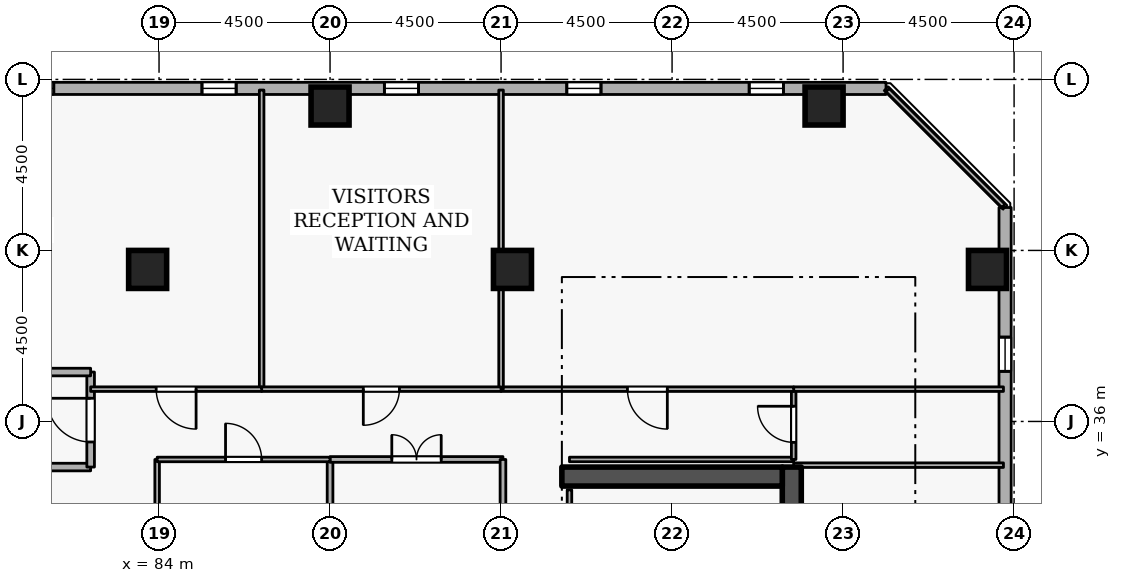
"""IFC4 building model, lengths in metres.
Left out: names, types, materials, properties, quantities, classifications, styles, units other than length and angle.
Written with IfcOpenShell. Run it as: python <this file> out.ifc"""

import sys

from ifc_helpers import new_model, si_unit, direction, frame, frame_2d, origin, origin_2d, place, context, subcontext, project, spatial, rectangle, extrude, element, fill, save


model = new_model("IFC4")
c1 = context("Model", 3, precision=1e-05, world=origin(), true_north=direction((0.0, 1.0)))
c2 = subcontext(c1, "Body", "Model", "MODEL_VIEW")
j1 = project(units=[si_unit("LENGTHUNIT", "METRE"), si_unit("PLANEANGLEUNIT", "RADIAN")], contexts=[c1])
p1 = place(None, origin())
s1 = spatial("IfcSite", under=j1, at=p1, CompositionType="ELEMENT")
p2 = place(p1, origin())
s2 = spatial("IfcBuilding", under=s1, at=p2, CompositionType="ELEMENT")
p3 = place(p2, frame((0.0, 0.0, 214.5)))
s3 = spatial("IfcBuildingStorey", under=s2, at=p3, CompositionType="ELEMENT", Elevation=214.5)
p4 = place(p3, frame((100.65, 19.2, 0.0), z_axis=(0.0, 0.0, 1.0), x_axis=(0.0, 1.0, 0.0)))
e1 = element("IfcWall", 1, at=p4, inside=s3, PredefinedType="SHEAR", context=c2, shape_type="SweptSolid", body=[
    extrude(rectangle(XDim=15.6, YDim=0.5, at=frame_2d((7.8, 0.0))), origin(), (0.0, 0.0, 1.0), 3.6),
])
p5 = place(p3, frame((94.6, 34.55, 0.0), z_axis=(0.0, 0.0, 1.0), x_axis=(1.0, 0.0, 0.0)))
e2 = element("IfcWall", 2, at=p5, inside=s3, PredefinedType="SHEAR", context=c2, shape_type="SweptSolid", body=[
    extrude(rectangle(XDim=5.8, YDim=0.5, at=frame_2d((2.9, 0.0))), origin(), (0.0, 0.0, 1.0), 3.6),
])
for number, where, z_axis, x_axis in (
    (3, (105.8, 40.0, 0.0), (0.0, 0.0, 1.0), (1.0, 0.0, 0.0)),
    (4, (101.5, 44.3, 0.0), (0.0, 0.0, 1.0), (1.0, 0.0, 0.0)),
    (5, (88.5, 44.3, 0.0), (0.0, 0.0, 1.0), (1.0, 0.0, 0.0)),
    (6, (93.3, 40.0, 0.0), (0.0, 0.0, 1.0), (1.0, 0.0, 0.0)),
    (7, (83.7, 40.0, 0.0), (0.0, 0.0, 1.0), (1.0, 0.0, 0.0)),
):
    element("IfcColumn", number, at=place(p3, frame(where, z_axis=z_axis, x_axis=x_axis)), inside=s3, PredefinedType="COLUMN", context=c2, shape_type="SweptSolid", body=[
        extrude(rectangle(XDim=1.0, YDim=1.0, at=origin_2d()), origin(), (0.0, 0.0, 1.0), 3.6),
    ])
p6 = place(p3, frame((106.265, 5.819, 0.0), z_axis=(0.0, 0.0, 1.0), x_axis=(-5.4540124e-05, 0.999999998513, 0.0)))
e8 = element("IfcWall", 8, at=p6, inside=s3, PredefinedType="STANDARD", context=c2, shape_type="SweptSolid", body=[
    extrude(rectangle(XDim=35.811, YDim=0.32, at=frame_2d((17.905, 0.0))), origin(), (0.0, 0.0, 1.0), 2.7),
])
p7 = place(p6, frame((2.7, 0.0, 0.72)))
e9 = element("IfcOpeningElement", 9, at=p7, cuts=e8, PredefinedType="OPENING", context=c2, shape_type="SweptSolid", body=[
    extrude(rectangle(XDim=0.9, YDim=1.75, at=frame_2d((0.45, 0.875))), frame((0.0, 0.17, 0.0), z_axis=(0.0, -1.0, 0.0), x_axis=(1.0, 0.0, 0.0)), (0.0, 0.0, 1.0), 0.34),
])
p8 = place(p6, frame((12.3, 0.0, 0.72)))
e10 = element("IfcOpeningElement", 10, at=p8, cuts=e8, PredefinedType="OPENING", context=c2, shape_type="SweptSolid", body=[
    extrude(rectangle(XDim=0.9, YDim=1.75, at=frame_2d((0.45, 0.875))), frame((0.0, 0.17, 0.0), z_axis=(0.0, -1.0, 0.0), x_axis=(1.0, 0.0, 0.0)), (0.0, 0.0, 1.0), 0.34),
])
p9 = place(p6, frame((17.1, 0.0, 0.72)))
e11 = element("IfcOpeningElement", 11, at=p9, cuts=e8, PredefinedType="OPENING", context=c2, shape_type="SweptSolid", body=[
    extrude(rectangle(XDim=0.9, YDim=1.75, at=frame_2d((0.45, 0.875))), frame((0.0, 0.17, 0.0), z_axis=(0.0, -1.0, 0.0), x_axis=(1.0, 0.0, 0.0)), (0.0, 0.0, 1.0), 0.34),
])
p10 = place(p6, frame((26.7, 0.0, 0.72)))
e12 = element("IfcOpeningElement", 12, at=p10, cuts=e8, PredefinedType="OPENING", context=c2, shape_type="SweptSolid", body=[
    extrude(rectangle(XDim=0.9, YDim=1.75, at=frame_2d((0.45, 0.875))), frame((0.0, 0.17, 0.0), z_axis=(0.0, -1.0, 0.0), x_axis=(1.0, 0.0, 0.0)), (0.0, 0.0, 1.0), 0.34),
])
p11 = place(p6, frame((31.5, 0.0, 0.72)))
e13 = element("IfcOpeningElement", 13, at=p11, cuts=e8, PredefinedType="OPENING", context=c2, shape_type="SweptSolid", body=[
    extrude(rectangle(XDim=0.9, YDim=1.75, at=frame_2d((0.45, 0.875))), frame((0.0, 0.17, 0.0), z_axis=(0.0, -1.0, 0.0), x_axis=(1.0, 0.0, 0.0)), (0.0, 0.0, 1.0), 0.34),
])
p12 = place(p3, frame((103.129, 44.763, 0.0), z_axis=(0.0, 0.0, 1.0), x_axis=(-0.999999998513, 5.4540124e-05, 0.0)))
e14 = element("IfcWall", 14, at=p12, inside=s3, PredefinedType="STANDARD", context=c2, shape_type="SweptSolid", body=[
    extrude(rectangle(XDim=35.811, YDim=0.32, at=frame_2d((17.905, 0.0))), origin(), (0.0, 0.0, 1.0), 2.7),
])
p13 = place(p12, frame((2.7, 0.0, 0.72)))
e15 = element("IfcOpeningElement", 15, at=p13, cuts=e14, PredefinedType="OPENING", context=c2, shape_type="SweptSolid", body=[
    extrude(rectangle(XDim=0.9, YDim=1.75, at=frame_2d((0.45, 0.875))), frame((0.0, 0.17, 0.0), z_axis=(0.0, -1.0, 0.0), x_axis=(1.0, 0.0, 0.0)), (0.0, 0.0, 1.0), 0.34),
])
p14 = place(p12, frame((7.5, 0.0, 0.72)))
e16 = element("IfcOpeningElement", 16, at=p14, cuts=e14, PredefinedType="OPENING", context=c2, shape_type="SweptSolid", body=[
    extrude(rectangle(XDim=0.9, YDim=1.75, at=frame_2d((0.45, 0.875))), frame((0.0, 0.17, 0.0), z_axis=(0.0, -1.0, 0.0), x_axis=(1.0, 0.0, 0.0)), (0.0, 0.0, 1.0), 0.34),
])
p15 = place(p12, frame((12.3, 0.0, 0.72)))
e17 = element("IfcOpeningElement", 17, at=p15, cuts=e14, PredefinedType="OPENING", context=c2, shape_type="SweptSolid", body=[
    extrude(rectangle(XDim=0.9, YDim=1.75, at=frame_2d((0.45, 0.875))), frame((0.0, 0.17, 0.0), z_axis=(0.0, -1.0, 0.0), x_axis=(1.0, 0.0, 0.0)), (0.0, 0.0, 1.0), 0.34),
])
p16 = place(p12, frame((17.1, 0.0, 0.72)))
e18 = element("IfcOpeningElement", 18, at=p16, cuts=e14, PredefinedType="OPENING", context=c2, shape_type="SweptSolid", body=[
    extrude(rectangle(XDim=0.9, YDim=1.75, at=frame_2d((0.45, 0.875))), frame((0.0, 0.17, 0.0), z_axis=(0.0, -1.0, 0.0), x_axis=(1.0, 0.0, 0.0)), (0.0, 0.0, 1.0), 0.34),
])
p17 = place(p12, frame((21.9, 0.0, 0.72)))
e19 = element("IfcOpeningElement", 19, at=p17, cuts=e14, PredefinedType="OPENING", context=c2, shape_type="SweptSolid", body=[
    extrude(rectangle(XDim=0.9, YDim=1.75, at=frame_2d((0.45, 0.875))), frame((0.0, 0.17, 0.0), z_axis=(0.0, -1.0, 0.0), x_axis=(1.0, 0.0, 0.0)), (0.0, 0.0, 1.0), 0.34),
])
p18 = place(p12, frame((31.5, 0.0, 0.72)))
e20 = element("IfcOpeningElement", 20, at=p18, cuts=e14, PredefinedType="OPENING", context=c2, shape_type="SweptSolid", body=[
    extrude(rectangle(XDim=0.9, YDim=1.75, at=frame_2d((0.45, 0.875))), frame((0.0, 0.17, 0.0), z_axis=(0.0, -1.0, 0.0), x_axis=(1.0, 0.0, 0.0)), (0.0, 0.0, 1.0), 0.34),
])
p19 = place(p3, frame((79.9, 34.8, 0.0), z_axis=(0.0, 0.0, 1.0), x_axis=(1.0, 0.0, 0.0)))
e21 = element("IfcWall", 21, at=p19, inside=s3, PredefinedType="STANDARD", context=c2, shape_type="SweptSolid", body=[
    extrude(rectangle(XDim=2.3, YDim=0.2, at=frame_2d((1.15, 0.0))), origin(), (0.0, 0.0, 1.0), 2.545),
])
p20 = place(p3, frame((82.2, 34.8, 0.0), z_axis=(0.0, 0.0, 1.0), x_axis=(0.0, 1.0, 0.0)))
e22 = element("IfcWall", 22, at=p20, inside=s3, PredefinedType="STANDARD", context=c2, shape_type="SweptSolid", body=[
    extrude(rectangle(XDim=2.5, YDim=0.2, at=frame_2d((1.25, 0.0))), origin(), (0.0, 0.0, 1.0), 3.34),
])
p21 = place(p20, frame((0.66, 0.0, 0.0)))
e23 = element("IfcOpeningElement", 23, at=p21, cuts=e22, PredefinedType="OPENING", context=c2, shape_type="SweptSolid", body=[
    extrude(rectangle(XDim=1.15, YDim=2.1, at=frame_2d((0.575, 1.05))), frame((0.0, 0.11, 0.0), z_axis=(0.0, -1.0, 0.0), x_axis=(1.0, 0.0, 0.0)), (0.0, 0.0, 1.0), 0.22),
])
p22 = place(p3, frame((82.2, 37.3, 0.0), z_axis=(0.0, 0.0, 1.0), x_axis=(-1.0, 0.0, 0.0)))
e24 = element("IfcWall", 24, at=p22, inside=s3, PredefinedType="STANDARD", context=c2, shape_type="SweptSolid", body=[
    extrude(rectangle(XDim=5.7, YDim=0.2, at=frame_2d((2.85, 0.0))), origin(), (0.0, 0.0, 1.0), 3.34),
])
p23 = place(p3, frame((94.8, 32.1, 0.0), z_axis=(0.0, 0.0, 1.0), x_axis=(0.0, 1.0, 0.0)))
e25 = element("IfcWall", 25, at=p23, inside=s3, PredefinedType="PARTITIONING", context=c2, shape_type="SweptSolid", body=[
    extrude(rectangle(XDim=2.1, YDim=0.12, at=frame_2d((1.05, 0.0))), origin(), (0.0, 0.0, 1.0), 3.34),
])
p24 = place(p23, frame((0.575, 0.0, 0.0)))
e26 = element("IfcOpeningElement", 26, at=p24, cuts=e25, PredefinedType="OPENING", context=c2, shape_type="SweptSolid", body=[
    extrude(rectangle(XDim=0.95, YDim=2.1, at=frame_2d((0.475, 1.05))), frame((0.0, 0.07, 0.0), z_axis=(0.0, -1.0, 0.0), x_axis=(1.0, 0.0, 0.0)), (0.0, 0.0, 1.0), 0.14),
])
p25 = place(p3, frame((94.8, 35.0, 0.0), z_axis=(0.0, 0.0, 1.0), x_axis=(1.0, 0.0, 0.0)))
e27 = element("IfcWall", 27, at=p25, inside=s3, PredefinedType="PARTITIONING", context=c2, shape_type="SweptSolid", body=[
    extrude(rectangle(XDim=5.9, YDim=0.12, at=frame_2d((2.95, 0.0))), origin(), (0.0, 0.0, 1.0), 3.34),
])
p26 = place(p3, frame((100.7, 35.0, 0.0), z_axis=(0.0, 0.0, 1.0), x_axis=(0.0, 1.0, 0.0)))
e28 = element("IfcWall", 28, at=p26, inside=s3, PredefinedType="PARTITIONING", context=c2, shape_type="SweptSolid", body=[
    extrude(rectangle(XDim=1.85, YDim=0.12, at=frame_2d((0.925, 0.0))), origin(), (0.0, 0.0, 1.0), 3.34),
])
p27 = place(p26, frame((0.45, 0.0, 0.0)))
e29 = element("IfcOpeningElement", 29, at=p27, cuts=e28, PredefinedType="OPENING", context=c2, shape_type="SweptSolid", body=[
    extrude(rectangle(XDim=0.95, YDim=2.1, at=frame_2d((0.475, 1.05))), frame((0.0, 0.07, 0.0), z_axis=(0.0, -1.0, 0.0), x_axis=(1.0, 0.0, 0.0)), (0.0, 0.0, 1.0), 0.14),
])
for number, where, z_axis, x_axis in (
    (30, (100.7, 36.85, 0.0), (0.0, 0.0, 1.0), (1.0, 0.0, 0.0)),
    (31, (106.22, 34.85, 0.0), (0.0, 0.0, 1.0), (-1.0, 0.0, 0.0)),
):
    element("IfcWall", number, at=place(p3, frame(where, z_axis=z_axis, x_axis=x_axis)), inside=s3, PredefinedType="PARTITIONING", context=c2, shape_type="SweptSolid", body=[
        extrude(rectangle(XDim=5.52, YDim=0.12, at=frame_2d((2.76, 0.0))), origin(), (0.0, 0.0, 1.0), 3.34),
    ])
p28 = place(p3, frame((100.7, 36.85, 0.0), z_axis=(0.0, 0.0, 1.0), x_axis=(-1.0, 0.0, 0.0)))
e32 = element("IfcWall", 32, at=p28, inside=s3, PredefinedType="PARTITIONING", context=c2, shape_type="SweptSolid", body=[
    extrude(rectangle(XDim=7.7, YDim=0.12, at=frame_2d((3.85, 0.0))), origin(), (0.0, 0.0, 1.0), 3.34),
])
p29 = place(p28, frame((3.325, 0.0, 0.0)))
e33 = element("IfcOpeningElement", 33, at=p29, cuts=e32, PredefinedType="OPENING", context=c2, shape_type="SweptSolid", body=[
    extrude(rectangle(XDim=1.05, YDim=2.1, at=frame_2d((0.525, 1.05))), frame((0.0, 0.07, 0.0), z_axis=(0.0, -1.0, 0.0), x_axis=(1.0, 0.0, 0.0)), (0.0, 0.0, 1.0), 0.14),
])
p30 = place(p3, frame((93.0, 36.85, 0.0), z_axis=(0.0, 0.0, 1.0), x_axis=(0.0, 1.0, 0.0)))
e34 = element("IfcWall", 34, at=p30, inside=s3, PredefinedType="PARTITIONING", context=c2, shape_type="SweptSolid", body=[
    extrude(rectangle(XDim=7.87, YDim=0.12, at=frame_2d((3.935, 0.0))), origin(), (0.0, 0.0, 1.0), 3.34),
])
p31 = place(p3, frame((103.171, 44.72, 0.0), z_axis=(0.0, 0.0, 1.0), x_axis=(0.707106781187, -0.707106781187, 0.0)))
e35 = element("IfcWall", 35, at=p31, inside=s3, PredefinedType="PARTITIONING", context=c2, shape_type="SweptSolid", body=[
    extrude(rectangle(XDim=4.311, YDim=0.12, at=frame_2d((2.156, 0.0))), origin(), (0.0, 0.0, 1.0), 3.34),
])
p32 = place(p3, frame((86.7, 36.85, 0.0), z_axis=(0.0, 0.0, 1.0), x_axis=(0.0, 1.0, 0.0)))
e36 = element("IfcWall", 36, at=p32, inside=s3, PredefinedType="PARTITIONING", context=c2, shape_type="SweptSolid", body=[
    extrude(rectangle(XDim=7.87, YDim=0.12, at=frame_2d((3.935, 0.0))), origin(), (0.0, 0.0, 1.0), 3.34),
])
p33 = place(p3, frame((93.0, 36.85, 0.0), z_axis=(0.0, 0.0, 1.0), x_axis=(-1.0, 0.0, 0.0)))
e37 = element("IfcWall", 37, at=p33, inside=s3, PredefinedType="PARTITIONING", context=c2, shape_type="SweptSolid", body=[
    extrude(rectangle(XDim=6.3, YDim=0.12, at=frame_2d((3.15, 0.0))), origin(), (0.0, 0.0, 1.0), 3.34),
])
p34 = place(p33, frame((2.675, 0.0, 0.0)))
e38 = element("IfcOpeningElement", 38, at=p34, cuts=e37, PredefinedType="OPENING", context=c2, shape_type="SweptSolid", body=[
    extrude(rectangle(XDim=0.95, YDim=2.1, at=frame_2d((0.475, 1.05))), frame((0.0, 0.07, 0.0), z_axis=(0.0, -1.0, 0.0), x_axis=(1.0, 0.0, 0.0)), (0.0, 0.0, 1.0), 0.14),
])
p35 = place(p3, frame((86.7, 36.85, 0.0), z_axis=(0.0, 0.0, 1.0), x_axis=(-1.0, 0.0, 0.0)))
e39 = element("IfcWall", 39, at=p35, inside=s3, PredefinedType="PARTITIONING", context=c2, shape_type="SweptSolid", body=[
    extrude(rectangle(XDim=4.5, YDim=0.12, at=frame_2d((2.25, 0.0))), origin(), (0.0, 0.0, 1.0), 3.34),
])
p36 = place(p35, frame((1.725, 0.0, 0.0)))
e40 = element("IfcOpeningElement", 40, at=p36, cuts=e39, PredefinedType="OPENING", context=c2, shape_type="SweptSolid", body=[
    extrude(rectangle(XDim=1.05, YDim=2.1, at=frame_2d((0.525, 1.05))), frame((0.0, 0.07, 0.0), z_axis=(0.0, -1.0, 0.0), x_axis=(1.0, 0.0, 0.0)), (0.0, 0.0, 1.0), 0.14),
])
p37 = place(p3, frame((88.5, 32.2, 0.0), z_axis=(0.0, 0.0, 1.0), x_axis=(0.0, 1.0, 0.0)))
e41 = element("IfcWall", 41, at=p37, inside=s3, PredefinedType="PARTITIONING", context=c2, shape_type="SweptSolid", body=[
    extrude(rectangle(XDim=2.8, YDim=0.15, at=frame_2d((1.4, 0.0))), origin(), (0.0, 0.0, 1.0), 2.878),
])
p38 = place(p3, frame((88.5, 35.0, 0.0), z_axis=(0.0, 0.0, 1.0), x_axis=(1.0, 0.0, 0.0)))
e42 = element("IfcWall", 42, at=p38, inside=s3, PredefinedType="PARTITIONING", context=c2, shape_type="SweptSolid", body=[
    extrude(rectangle(XDim=4.55, YDim=0.15, at=frame_2d((2.275, 0.0))), origin(), (0.0, 0.0, 1.0), 3.34),
])
p39 = place(p38, frame((1.625, 0.0, 0.0)))
e43 = element("IfcOpeningElement", 43, at=p39, cuts=e42, PredefinedType="OPENING", context=c2, shape_type="SweptSolid", body=[
    extrude(rectangle(XDim=1.3, YDim=2.12, at=frame_2d((0.65, 1.06))), frame((0.0, 0.085, 0.0), z_axis=(0.0, -1.0, 0.0), x_axis=(1.0, 0.0, 0.0)), (0.0, 0.0, 1.0), 0.17),
])
p40 = place(p3, frame((93.05, 35.0, 0.0), z_axis=(0.0, 0.0, 1.0), x_axis=(0.0, -1.0, 0.0)))
e44 = element("IfcWall", 44, at=p40, inside=s3, PredefinedType="PARTITIONING", context=c2, shape_type="SweptSolid", body=[
    extrude(rectangle(XDim=2.8, YDim=0.15, at=frame_2d((1.4, 0.0))), origin(), (0.0, 0.0, 1.0), 3.34),
])
p41 = place(p3, frame((83.95, 32.2, 0.0), z_axis=(0.0, 0.0, 1.0), x_axis=(0.0, 1.0, 0.0)))
e45 = element("IfcWall", 45, at=p41, inside=s3, PredefinedType="PARTITIONING", context=c2, shape_type="SweptSolid", body=[
    extrude(rectangle(XDim=2.8, YDim=0.12, at=frame_2d((1.4, 0.0))), origin(), (0.0, 0.0, 1.0), 3.34),
])
p42 = place(p3, frame((83.95, 35.0, 0.0), z_axis=(0.0, 0.0, 1.0), x_axis=(1.0, 0.0, 0.0)))
e46 = element("IfcWall", 46, at=p42, inside=s3, PredefinedType="PARTITIONING", context=c2, shape_type="SweptSolid", body=[
    extrude(rectangle(XDim=4.55, YDim=0.12, at=frame_2d((2.275, 0.0))), origin(), (0.0, 0.0, 1.0), 3.34),
])
p43 = place(p42, frame((1.8, 0.0, 0.0)))
e47 = element("IfcOpeningElement", 47, at=p43, cuts=e46, PredefinedType="OPENING", context=c2, shape_type="SweptSolid", body=[
    extrude(rectangle(XDim=0.95, YDim=2.1, at=frame_2d((0.475, 1.05))), frame((0.0, 0.07, 0.0), z_axis=(0.0, -1.0, 0.0), x_axis=(1.0, 0.0, 0.0)), (0.0, 0.0, 1.0), 0.14),
])
p44 = place(p11, origin())
e48 = element("IfcWindow", 48, at=p44, inside=s3, PartitioningType="SINGLE_PANEL", PredefinedType="WINDOW", context=c2, shape_type="SweptSolid", body=[
    extrude(rectangle(XDim=0.9, YDim=1.75, at=frame_2d((0.45, 0.875))), frame((0.0, 0.03, 0.0), z_axis=(0.0, -1.0, 0.0), x_axis=(1.0, 0.0, 0.0)), (0.0, 0.0, 1.0), 0.06),
])
fill(e13, e48)
p45 = place(p13, origin())
e49 = element("IfcWindow", 49, at=p45, inside=s3, PartitioningType="SINGLE_PANEL", PredefinedType="WINDOW", context=c2, shape_type="SweptSolid", body=[
    extrude(rectangle(XDim=0.9, YDim=1.75, at=frame_2d((0.45, 0.875))), frame((0.0, 0.03, 0.0), z_axis=(0.0, -1.0, 0.0), x_axis=(1.0, 0.0, 0.0)), (0.0, 0.0, 1.0), 0.06),
])
fill(e15, e49)
p46 = place(p14, origin())
e50 = element("IfcWindow", 50, at=p46, inside=s3, PartitioningType="SINGLE_PANEL", PredefinedType="WINDOW", context=c2, shape_type="SweptSolid", body=[
    extrude(rectangle(XDim=0.9, YDim=1.75, at=frame_2d((0.45, 0.875))), frame((0.0, 0.03, 0.0), z_axis=(0.0, -1.0, 0.0), x_axis=(1.0, 0.0, 0.0)), (0.0, 0.0, 1.0), 0.06),
])
fill(e16, e50)
p47 = place(p15, origin())
e51 = element("IfcWindow", 51, at=p47, inside=s3, PartitioningType="SINGLE_PANEL", PredefinedType="WINDOW", context=c2, shape_type="SweptSolid", body=[
    extrude(rectangle(XDim=0.9, YDim=1.75, at=frame_2d((0.45, 0.875))), frame((0.0, 0.03, 0.0), z_axis=(0.0, -1.0, 0.0), x_axis=(1.0, 0.0, 0.0)), (0.0, 0.0, 1.0), 0.06),
])
fill(e17, e51)
p48 = place(p16, origin())
e52 = element("IfcWindow", 52, at=p48, inside=s3, PartitioningType="SINGLE_PANEL", PredefinedType="WINDOW", context=c2, shape_type="SweptSolid", body=[
    extrude(rectangle(XDim=0.9, YDim=1.75, at=frame_2d((0.45, 0.875))), frame((0.0, 0.03, 0.0), z_axis=(0.0, -1.0, 0.0), x_axis=(1.0, 0.0, 0.0)), (0.0, 0.0, 1.0), 0.06),
])
fill(e18, e52)
p49 = place(p17, origin())
e53 = element("IfcWindow", 53, at=p49, inside=s3, PartitioningType="SINGLE_PANEL", PredefinedType="WINDOW", context=c2, shape_type="SweptSolid", body=[
    extrude(rectangle(XDim=0.9, YDim=1.75, at=frame_2d((0.45, 0.875))), frame((0.0, 0.03, 0.0), z_axis=(0.0, -1.0, 0.0), x_axis=(1.0, 0.0, 0.0)), (0.0, 0.0, 1.0), 0.06),
])
fill(e19, e53)
p50 = place(p21, origin())
e54 = element("IfcDoor", 54, at=p50, inside=s3, OperationType="SINGLE_SWING_RIGHT", PredefinedType="DOOR", context=c2, shape_type="SweptSolid", body=[
    extrude(rectangle(XDim=1.15, YDim=2.1, at=frame_2d((0.575, 1.05))), frame((0.0, 0.025, 0.0), z_axis=(0.0, -1.0, 0.0), x_axis=(1.0, 0.0, 0.0)), (0.0, 0.0, 1.0), 0.05),
])
fill(e23, e54)
p51 = place(p27, origin())
e55 = element("IfcDoor", 55, at=p51, inside=s3, OperationType="SINGLE_SWING_RIGHT", PredefinedType="DOOR", context=c2, shape_type="SweptSolid", body=[
    extrude(rectangle(XDim=0.95, YDim=2.1, at=frame_2d((0.475, 1.05))), frame((0.0, 0.025, 0.0), z_axis=(0.0, -1.0, 0.0), x_axis=(1.0, 0.0, 0.0)), (0.0, 0.0, 1.0), 0.05),
])
fill(e29, e55)
p52 = place(p29, origin())
e56 = element("IfcDoor", 56, at=p52, inside=s3, OperationType="SINGLE_SWING_LEFT", PredefinedType="DOOR", context=c2, shape_type="SweptSolid", body=[
    extrude(rectangle(XDim=1.05, YDim=2.1, at=frame_2d((0.525, 1.05))), frame((0.0, 0.025, 0.0), z_axis=(0.0, -1.0, 0.0), x_axis=(1.0, 0.0, 0.0)), (0.0, 0.0, 1.0), 0.05),
])
fill(e33, e56)
p53 = place(p34, origin())
e57 = element("IfcDoor", 57, at=p53, inside=s3, OperationType="SINGLE_SWING_RIGHT", PredefinedType="DOOR", context=c2, shape_type="SweptSolid", body=[
    extrude(rectangle(XDim=0.95, YDim=2.1, at=frame_2d((0.475, 1.05))), frame((0.0, 0.025, 0.0), z_axis=(0.0, -1.0, 0.0), x_axis=(1.0, 0.0, 0.0)), (0.0, 0.0, 1.0), 0.05),
])
fill(e38, e57)
p54 = place(p36, origin())
e58 = element("IfcDoor", 58, at=p54, inside=s3, OperationType="SINGLE_SWING_LEFT", PredefinedType="DOOR", context=c2, shape_type="SweptSolid", body=[
    extrude(rectangle(XDim=1.05, YDim=2.1, at=frame_2d((0.525, 1.05))), frame((0.0, 0.025, 0.0), z_axis=(0.0, -1.0, 0.0), x_axis=(1.0, 0.0, 0.0)), (0.0, 0.0, 1.0), 0.05),
])
fill(e40, e58)
p55 = place(p39, origin())
e59 = element("IfcDoor", 59, at=p55, inside=s3, OperationType="DOUBLE_DOOR_SINGLE_SWING", PredefinedType="DOOR", context=c2, shape_type="SweptSolid", body=[
    extrude(rectangle(XDim=1.3, YDim=2.12, at=frame_2d((0.65, 1.06))), frame((0.0, 0.025, 0.0), z_axis=(0.0, -1.0, 0.0), x_axis=(1.0, 0.0, 0.0)), (0.0, 0.0, 1.0), 0.05),
])
fill(e43, e59)
p56 = place(p43, origin())
e60 = element("IfcDoor", 60, at=p56, inside=s3, OperationType="SINGLE_SWING_LEFT", PredefinedType="DOOR", context=c2, shape_type="SweptSolid", body=[
    extrude(rectangle(XDim=0.95, YDim=2.1, at=frame_2d((0.475, 1.05))), frame((0.0, 0.025, 0.0), z_axis=(0.0, -1.0, 0.0), x_axis=(1.0, 0.0, 0.0)), (0.0, 0.0, 1.0), 0.05),
])
fill(e47, e60)
save(model, sys.argv[1])
